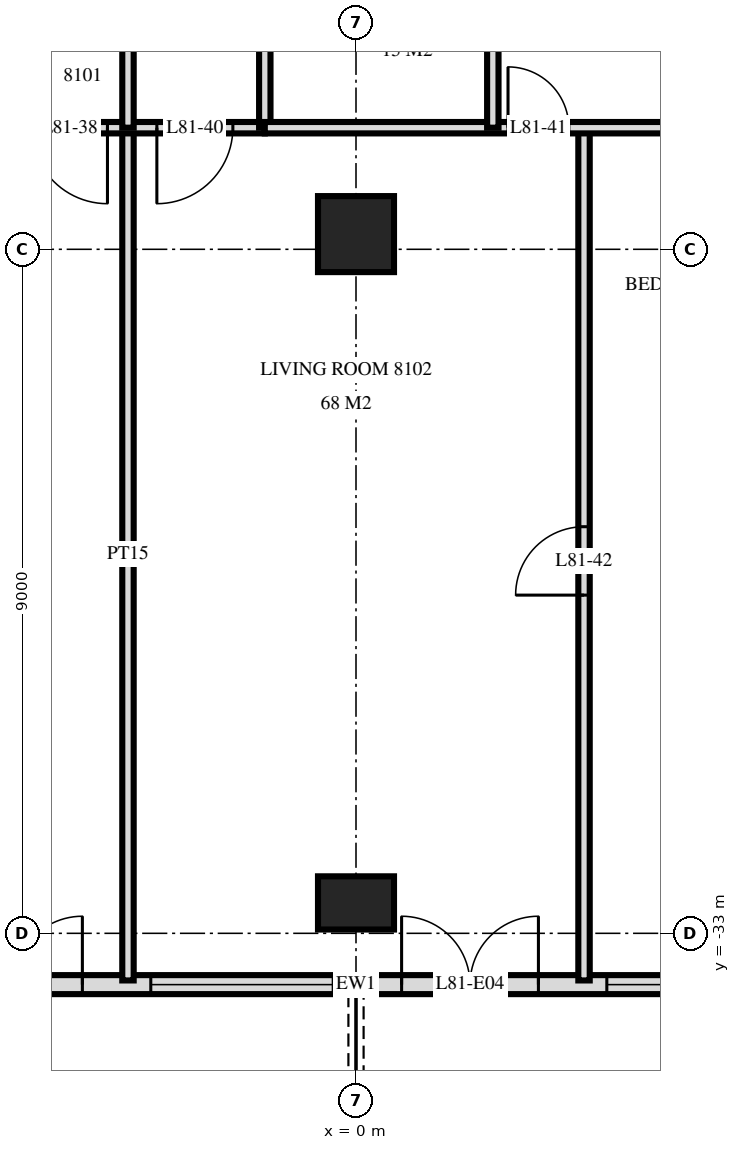
"""IFC4 building model, lengths in metres.
Left out: names, types, materials, properties, quantities, classifications, styles, units other than length and angle.
Written with IfcOpenShell. Run it as: python <this file> out.ifc"""

import sys

from ifc_helpers import new_model, si_unit, direction, frame, frame_2d, origin, origin_2d, place, context, subcontext, project, spatial, rectangle, extrude, element, fill, save


model = new_model("IFC4")
c1 = context("Model", 3, precision=1e-05, world=origin(), true_north=direction((0.0, 1.0)))
c2 = subcontext(c1, "Body", "Model", "MODEL_VIEW")
j1 = project(units=[si_unit("LENGTHUNIT", "METRE"), si_unit("PLANEANGLEUNIT", "RADIAN")], contexts=[c1])
p1 = place(None, origin())
s1 = spatial("IfcSite", under=j1, at=p1, CompositionType="ELEMENT")
p2 = place(p1, origin())
s2 = spatial("IfcBuilding", under=s1, at=p2, CompositionType="ELEMENT")
p3 = place(p2, frame((0.0, 0.0, 305.1)))
s3 = spatial("IfcBuildingStorey", under=s2, at=p3, CompositionType="ELEMENT", Elevation=305.1)
p4 = place(p3, frame((0.0, -32.6, 0.0), z_axis=(0.0, 0.0, 1.0), x_axis=(1.0, 0.0, 0.0)))
e1 = element("IfcColumn", 1, at=p4, inside=s3, PredefinedType="COLUMN", context=c2, shape_type="SweptSolid", body=[
    extrude(rectangle(XDim=1.0, YDim=0.7, at=origin_2d()), origin(), (0.0, 0.0, 1.0), 3.5),
])
p5 = place(p3, frame((0.0, -23.8, 0.0), z_axis=(0.0, 0.0, 1.0), x_axis=(1.0, 0.0, 0.0)))
e2 = element("IfcColumn", 2, at=p5, inside=s3, PredefinedType="COLUMN", context=c2, shape_type="SweptSolid", body=[
    extrude(rectangle(XDim=1.0, YDim=1.0, at=origin_2d()), origin(), (0.0, 0.0, 1.0), 3.5),
])
p6 = place(p3, frame((-18.575, -33.675, 0.0), z_axis=(0.0, 0.0, 1.0), x_axis=(1.0, 0.0, 0.0)))
e3 = element("IfcWall", 3, at=p6, inside=s3, PredefinedType="SOLIDWALL", context=c2, shape_type="SweptSolid", body=[
    extrude(rectangle(XDim=37.151, YDim=0.25, at=frame_2d((18.575, 0.0))), origin(), (0.0, 0.0, 1.0), 3.2),
])
p7 = place(p6, frame((1.175, 0.0, 0.0)))
e4 = element("IfcOpeningElement", 4, at=p7, cuts=e3, PredefinedType="OPENING", context=c2, shape_type="SweptSolid", body=[
    extrude(rectangle(XDim=1.8, YDim=2.4, at=frame_2d((0.9, 1.2))), frame((0.0, 0.135, 0.0), z_axis=(0.0, -1.0, 0.0), x_axis=(1.0, 0.0, 0.0)), (0.0, 0.0, 1.0), 0.27),
])
p8 = place(p6, frame((5.637, 0.0, 0.9)))
e5 = element("IfcOpeningElement", 5, at=p8, cuts=e3, PredefinedType="OPENING", context=c2, shape_type="SweptSolid", body=[
    extrude(rectangle(XDim=1.8, YDim=1.5, at=frame_2d((0.9, 0.75))), frame((0.0, 0.135, 0.0), z_axis=(0.0, -1.0, 0.0), x_axis=(1.0, 0.0, 0.0)), (0.0, 0.0, 1.0), 0.27),
])
p9 = place(p6, frame((7.663, 0.0, 0.0)))
e6 = element("IfcOpeningElement", 6, at=p9, cuts=e3, PredefinedType="OPENING", context=c2, shape_type="SweptSolid", body=[
    extrude(rectangle(XDim=1.8, YDim=2.4, at=frame_2d((0.9, 1.2))), frame((0.0, 0.135, 0.0), z_axis=(0.0, -1.0, 0.0), x_axis=(1.0, 0.0, 0.0)), (0.0, 0.0, 1.0), 0.27),
])
p10 = place(p6, frame((9.875, 0.0, 0.9)))
e7 = element("IfcOpeningElement", 7, at=p10, cuts=e3, PredefinedType="OPENING", context=c2, shape_type="SweptSolid", body=[
    extrude(rectangle(XDim=2.4, YDim=1.5, at=frame_2d((1.2, 0.75))), frame((0.0, 0.135, 0.0), z_axis=(0.0, -1.0, 0.0), x_axis=(1.0, 0.0, 0.0)), (0.0, 0.0, 1.0), 0.27),
])
p11 = place(p6, frame((13.175, 0.0, 0.0)))
e8 = element("IfcOpeningElement", 8, at=p11, cuts=e3, PredefinedType="OPENING", context=c2, shape_type="SweptSolid", body=[
    extrude(rectangle(XDim=1.8, YDim=2.4, at=frame_2d((0.9, 1.2))), frame((0.0, 0.135, 0.0), z_axis=(0.0, -1.0, 0.0), x_axis=(1.0, 0.0, 0.0)), (0.0, 0.0, 1.0), 0.27),
])
p12 = place(p6, frame((15.875, 0.0, 0.9)))
e9 = element("IfcOpeningElement", 9, at=p12, cuts=e3, PredefinedType="OPENING", context=c2, shape_type="SweptSolid", body=[
    extrude(rectangle(XDim=2.4, YDim=1.5, at=frame_2d((1.2, 0.75))), frame((0.0, 0.135, 0.0), z_axis=(0.0, -1.0, 0.0), x_axis=(1.0, 0.0, 0.0)), (0.0, 0.0, 1.0), 0.27),
])
p13 = place(p6, frame((19.175, 0.0, 0.0)))
e10 = element("IfcOpeningElement", 10, at=p13, cuts=e3, PredefinedType="OPENING", context=c2, shape_type="SweptSolid", body=[
    extrude(rectangle(XDim=1.8, YDim=2.4, at=frame_2d((0.9, 1.2))), frame((0.0, 0.135, 0.0), z_axis=(0.0, -1.0, 0.0), x_axis=(1.0, 0.0, 0.0)), (0.0, 0.0, 1.0), 0.27),
])
p14 = place(p6, frame((21.875, 0.0, 0.9)))
e11 = element("IfcOpeningElement", 11, at=p14, cuts=e3, PredefinedType="OPENING", context=c2, shape_type="SweptSolid", body=[
    extrude(rectangle(XDim=2.4, YDim=1.5, at=frame_2d((1.2, 0.75))), frame((0.0, 0.135, 0.0), z_axis=(0.0, -1.0, 0.0), x_axis=(1.0, 0.0, 0.0)), (0.0, 0.0, 1.0), 0.27),
])
p15 = place(p6, frame((25.063, 0.0, 0.9)))
e12 = element("IfcOpeningElement", 12, at=p15, cuts=e3, PredefinedType="OPENING", context=c2, shape_type="SweptSolid", body=[
    extrude(rectangle(XDim=1.8, YDim=1.5, at=frame_2d((0.9, 0.75))), frame((0.0, 0.135, 0.0), z_axis=(0.0, -1.0, 0.0), x_axis=(1.0, 0.0, 0.0)), (0.0, 0.0, 1.0), 0.27),
])
p16 = place(p6, frame((27.838, 0.0, 0.0)))
e13 = element("IfcOpeningElement", 13, at=p16, cuts=e3, PredefinedType="OPENING", context=c2, shape_type="SweptSolid", body=[
    extrude(rectangle(XDim=1.8, YDim=2.4, at=frame_2d((0.9, 1.2))), frame((0.0, 0.135, 0.0), z_axis=(0.0, -1.0, 0.0), x_axis=(1.0, 0.0, 0.0)), (0.0, 0.0, 1.0), 0.27),
])
p17 = place(p6, frame((31.175, 0.0, 0.0)))
e14 = element("IfcOpeningElement", 14, at=p17, cuts=e3, PredefinedType="OPENING", context=c2, shape_type="SweptSolid", body=[
    extrude(rectangle(XDim=1.8, YDim=2.4, at=frame_2d((0.9, 1.2))), frame((0.0, 0.135, 0.0), z_axis=(0.0, -1.0, 0.0), x_axis=(1.0, 0.0, 0.0)), (0.0, 0.0, 1.0), 0.27),
])
p18 = place(p3, frame((3.0, -33.62, 0.0), z_axis=(0.0, 0.0, 1.0), x_axis=(0.0, 1.0, 0.0)))
e15 = element("IfcWall", 15, at=p18, inside=s3, PredefinedType="PARTITIONING", context=c2, shape_type="SweptSolid", body=[
    extrude(rectangle(XDim=11.22, YDim=0.15, at=frame_2d((5.61, 0.0))), origin(), (0.0, 0.0, 1.0), 3.22),
])
p19 = place(p18, frame((5.07, 0.0, 0.0)))
e16 = element("IfcOpeningElement", 16, at=p19, cuts=e15, PredefinedType="OPENING", context=c2, shape_type="SweptSolid", body=[
    extrude(rectangle(XDim=0.9, YDim=2.1, at=frame_2d((0.45, 1.05))), frame((0.0, 0.085, 0.0), z_axis=(0.0, -1.0, 0.0), x_axis=(1.0, 0.0, 0.0)), (0.0, 0.0, 1.0), 0.17),
])
p20 = place(p3, frame((1.8, -22.4, 0.0), z_axis=(0.0, 0.0, 1.0), x_axis=(0.0, 1.0, 0.0)))
e17 = element("IfcWall", 17, at=p20, inside=s3, PredefinedType="PARTITIONING", context=c2, shape_type="SweptSolid", body=[
    extrude(rectangle(XDim=5.0, YDim=0.15, at=frame_2d((2.5, 0.0))), origin(), (0.0, 0.0, 1.0), 3.22),
])
p21 = place(p3, frame((-1.2, -22.4, 0.0), z_axis=(0.0, 0.0, 1.0), x_axis=(0.0, 1.0, 0.0)))
e18 = element("IfcWall", 18, at=p21, inside=s3, PredefinedType="PARTITIONING", context=c2, shape_type="SweptSolid", body=[
    extrude(rectangle(XDim=5.0, YDim=0.15, at=frame_2d((2.5, 0.0))), origin(), (0.0, 0.0, 1.0), 3.22),
])
p22 = place(p21, frame((2.02, 0.0, 0.0)))
e19 = element("IfcOpeningElement", 19, at=p22, cuts=e18, PredefinedType="OPENING", context=c2, shape_type="SweptSolid", body=[
    extrude(rectangle(XDim=1.0, YDim=2.1, at=frame_2d((0.5, 1.05))), frame((0.0, 0.085, 0.0), z_axis=(0.0, -1.0, 0.0), x_axis=(1.0, 0.0, 0.0)), (0.0, 0.0, 1.0), 0.17),
])
p23 = place(p3, frame((-3.0, -22.4, 0.0), z_axis=(0.0, 0.0, 1.0), x_axis=(0.0, 1.0, 0.0)))
e20 = element("IfcWall", 20, at=p23, inside=s3, PredefinedType="PARTITIONING", context=c2, shape_type="SweptSolid", body=[
    extrude(rectangle(XDim=5.0, YDim=0.15, at=frame_2d((2.5, 0.0))), origin(), (0.0, 0.0, 1.0), 3.22),
])
p24 = place(p3, frame((-3.0, -33.62, 0.0), z_axis=(0.0, 0.0, 1.0), x_axis=(0.0, 1.0, 0.0)))
e21 = element("IfcWall", 21, at=p24, inside=s3, PredefinedType="PARTITIONING", context=c2, shape_type="SweptSolid", body=[
    extrude(rectangle(XDim=11.22, YDim=0.15, at=frame_2d((5.61, 0.0))), origin(), (0.0, 0.0, 1.0), 3.22),
])
p25 = place(p3, frame((-4.5, -22.4, 0.0), z_axis=(0.0, 0.0, 1.0), x_axis=(1.0, 0.0, 0.0)))
e22 = element("IfcWall", 22, at=p25, inside=s3, PredefinedType="PARTITIONING", context=c2, shape_type="SweptSolid", body=[
    extrude(rectangle(XDim=3.3, YDim=0.15, at=frame_2d((1.65, 0.0))), origin(), (0.0, 0.0, 1.0), 3.22),
])
p26 = place(p25, frame((0.23, 0.0, 0.0)))
e23 = element("IfcOpeningElement", 23, at=p26, cuts=e22, PredefinedType="OPENING", context=c2, shape_type="SweptSolid", body=[
    extrude(rectangle(XDim=1.0, YDim=2.1, at=frame_2d((0.5, 1.05))), frame((0.0, 0.085, 0.0), z_axis=(0.0, -1.0, 0.0), x_axis=(1.0, 0.0, 0.0)), (0.0, 0.0, 1.0), 0.17),
])
p27 = place(p25, frame((1.88, 0.0, 0.0)))
e24 = element("IfcOpeningElement", 24, at=p27, cuts=e22, PredefinedType="OPENING", context=c2, shape_type="SweptSolid", body=[
    extrude(rectangle(XDim=1.0, YDim=2.1, at=frame_2d((0.5, 1.05))), frame((0.0, 0.085, 0.0), z_axis=(0.0, -1.0, 0.0), x_axis=(1.0, 0.0, 0.0)), (0.0, 0.0, 1.0), 0.17),
])
p28 = place(p3, frame((-1.2, -22.4, 0.0), z_axis=(0.0, 0.0, 1.0), x_axis=(1.0, 0.0, 0.0)))
e25 = element("IfcWall", 25, at=p28, inside=s3, PredefinedType="PARTITIONING", context=c2, shape_type="SweptSolid", body=[
    extrude(rectangle(XDim=7.2, YDim=0.15, at=frame_2d((3.6, 0.0))), origin(), (0.0, 0.0, 1.0), 3.22),
])
p29 = place(p28, frame((3.2, 0.0, 0.0)))
e26 = element("IfcOpeningElement", 26, at=p29, cuts=e25, PredefinedType="OPENING", context=c2, shape_type="SweptSolid", body=[
    extrude(rectangle(XDim=0.8, YDim=2.1, at=frame_2d((0.4, 1.05))), frame((0.0, 0.085, 0.0), z_axis=(0.0, -1.0, 0.0), x_axis=(1.0, 0.0, 0.0)), (0.0, 0.0, 1.0), 0.17),
])
p30 = place(p11, origin())
e27 = element("IfcDoor", 27, at=p30, inside=s3, OperationType="DOUBLE_DOOR_SINGLE_SWING", PredefinedType="DOOR", context=c2, shape_type="SweptSolid", body=[
    extrude(rectangle(XDim=1.8, YDim=2.4, at=frame_2d((0.9, 1.2))), frame((0.0, 0.025, 0.0), z_axis=(0.0, -1.0, 0.0), x_axis=(1.0, 0.0, 0.0)), (0.0, 0.0, 1.0), 0.05),
])
fill(e8, e27)
p31 = place(p12, origin())
e28 = element("IfcWindow", 28, at=p31, inside=s3, PartitioningType="SINGLE_PANEL", PredefinedType="WINDOW", context=c2, shape_type="SweptSolid", body=[
    extrude(rectangle(XDim=2.4, YDim=1.5, at=frame_2d((1.2, 0.75))), frame((0.0, 0.03, 0.0), z_axis=(0.0, -1.0, 0.0), x_axis=(1.0, 0.0, 0.0)), (0.0, 0.0, 1.0), 0.06),
])
fill(e9, e28)
p32 = place(p13, origin())
e29 = element("IfcDoor", 29, at=p32, inside=s3, OperationType="DOUBLE_DOOR_SINGLE_SWING", PredefinedType="DOOR", context=c2, shape_type="SweptSolid", body=[
    extrude(rectangle(XDim=1.8, YDim=2.4, at=frame_2d((0.9, 1.2))), frame((0.0, 0.025, 0.0), z_axis=(0.0, -1.0, 0.0), x_axis=(1.0, 0.0, 0.0)), (0.0, 0.0, 1.0), 0.05),
])
fill(e10, e29)
p33 = place(p14, origin())
e30 = element("IfcWindow", 30, at=p33, inside=s3, PartitioningType="SINGLE_PANEL", PredefinedType="WINDOW", context=c2, shape_type="SweptSolid", body=[
    extrude(rectangle(XDim=2.4, YDim=1.5, at=frame_2d((1.2, 0.75))), frame((0.0, 0.03, 0.0), z_axis=(0.0, -1.0, 0.0), x_axis=(1.0, 0.0, 0.0)), (0.0, 0.0, 1.0), 0.06),
])
fill(e11, e30)
p34 = place(p26, frame((0.5, 0.0, 0.0), z_axis=(0.0, 0.0, 1.0), x_axis=(-1.0, 0.0, 0.0)))
e31 = element("IfcDoor", 31, at=p34, inside=s3, OperationType="SINGLE_SWING_RIGHT", PredefinedType="DOOR", context=c2, shape_type="SweptSolid", body=[
    extrude(rectangle(XDim=1.0, YDim=2.1, at=frame_2d((0.0, 1.05))), frame((0.0, -0.025, 0.0), z_axis=(0.0, 1.0, 0.0), x_axis=(-1.0, 0.0, 0.0)), (0.0, 0.0, 1.0), 0.05),
])
fill(e23, e31)
p35 = place(p27, frame((0.5, 0.0, 0.0), z_axis=(0.0, 0.0, 1.0), x_axis=(-1.0, 0.0, 0.0)))
e32 = element("IfcDoor", 32, at=p35, inside=s3, OperationType="SINGLE_SWING_LEFT", PredefinedType="DOOR", context=c2, shape_type="SweptSolid", body=[
    extrude(rectangle(XDim=1.0, YDim=2.1, at=frame_2d((0.0, 1.05))), frame((0.0, -0.025, 0.0), z_axis=(0.0, 1.0, 0.0), x_axis=(-1.0, 0.0, 0.0)), (0.0, 0.0, 1.0), 0.05),
])
fill(e24, e32)
p36 = place(p29, origin())
e33 = element("IfcDoor", 33, at=p36, inside=s3, OperationType="SINGLE_SWING_RIGHT", PredefinedType="DOOR", context=c2, shape_type="SweptSolid", body=[
    extrude(rectangle(XDim=0.8, YDim=2.1, at=frame_2d((0.4, 1.05))), frame((0.0, 0.025, 0.0), z_axis=(0.0, -1.0, 0.0), x_axis=(1.0, 0.0, 0.0)), (0.0, 0.0, 1.0), 0.05),
])
fill(e26, e33)
p37 = place(p19, origin())
e34 = element("IfcDoor", 34, at=p37, inside=s3, OperationType="SINGLE_SWING_RIGHT", PredefinedType="DOOR", context=c2, shape_type="SweptSolid", body=[
    extrude(rectangle(XDim=0.9, YDim=2.1, at=frame_2d((0.45, 1.05))), frame((0.0, 0.025, 0.0), z_axis=(0.0, -1.0, 0.0), x_axis=(1.0, 0.0, 0.0)), (0.0, 0.0, 1.0), 0.05),
])
fill(e16, e34)
save(model, sys.argv[1])
